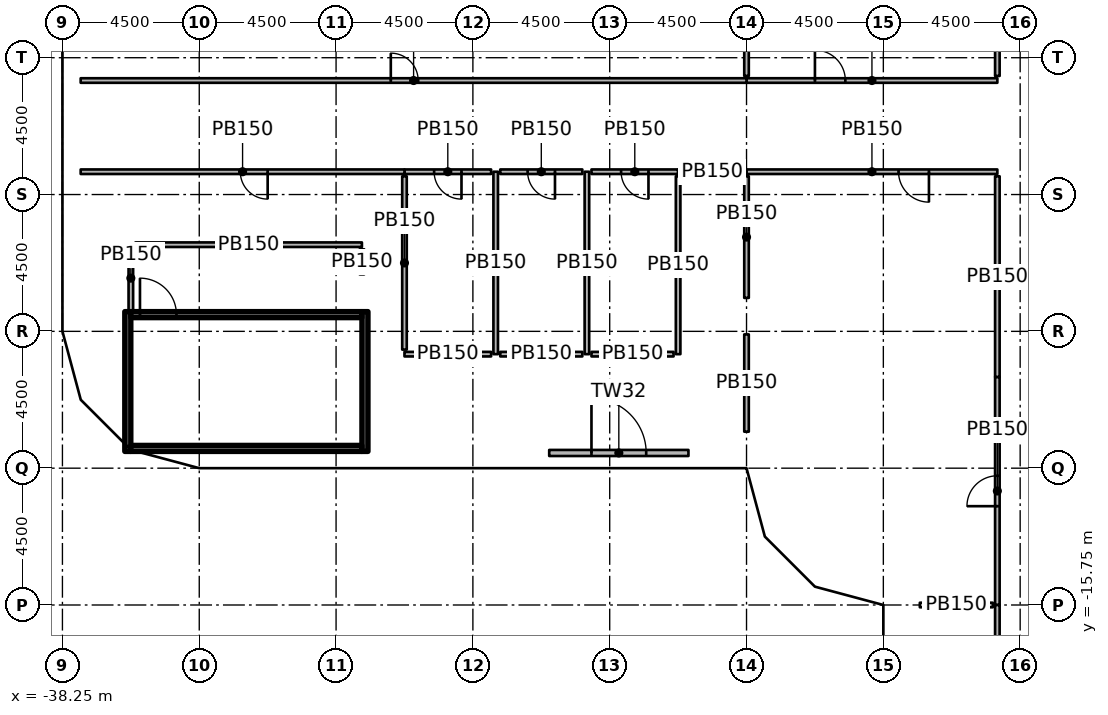
"""IFC4 building model, lengths in metres.
Left out: names, types, materials, properties, quantities, classifications, styles, units other than length and angle.
Written with IfcOpenShell. Run it as: python <this file> out.ifc"""

import sys

from ifc_helpers import new_model, si_unit, direction, frame, frame_2d, origin, origin_2d, place, context, subcontext, project, spatial, rectangle, extrude, element, fill, save


model = new_model("IFC4")
c1 = context("Model", 3, precision=1e-05, world=origin(), true_north=direction((0.0, 1.0)))
c2 = subcontext(c1, "Body", "Model", "MODEL_VIEW")
j1 = project(units=[si_unit("LENGTHUNIT", "METRE"), si_unit("PLANEANGLEUNIT", "RADIAN")], contexts=[c1])
p1 = place(None, origin())
s1 = spatial("IfcSite", under=j1, at=p1, CompositionType="ELEMENT")
p2 = place(p1, origin())
s2 = spatial("IfcBuilding", under=s1, at=p2, CompositionType="ELEMENT")
p3 = place(p2, frame((0.0, 0.0, 22.0)))
s3 = spatial("IfcBuildingStorey", under=s2, at=p3, CompositionType="ELEMENT", Elevation=22.0)
p4 = place(p3, frame((-37.65, 2.25, 0.0), z_axis=(0.0, 0.0, 1.0), x_axis=(1.0, 0.0, 0.0)))
e1 = element("IfcColumn", 1, at=p4, inside=s3, PredefinedType="COLUMN", context=c2, shape_type="SweptSolid", body=[
    extrude(rectangle(XDim=1.2, YDim=1.2, at=origin_2d()), origin(), (0.0, 0.0, 1.0), 4.55),
])
for number, where, z_axis, x_axis in (
    (2, (-33.11, -2.25, 0.0), (0.0, 0.0, 1.0), (1.0, 0.0, 0.0)),
    (3, (-33.11, 2.25, 0.0), (0.0, 0.0, 1.0), (1.0, 0.0, 0.0)),
    (4, (-28.908, -5.475, 0.0), (0.0, 0.0, 1.0), (1.0, 0.0, 0.0)),
):
    element("IfcColumn", number, at=place(p3, frame(where, z_axis=z_axis, x_axis=x_axis)), inside=s3, PredefinedType="COLUMN", context=c2, shape_type="SweptSolid", body=[
        extrude(rectangle(XDim=1.2, YDim=1.2, at=origin_2d()), origin(), (0.0, 0.0, 1.0), 4.85),
    ])
p5 = place(p3, frame((-24.75, -10.65, 0.0), z_axis=(0.0, 0.0, 1.0), x_axis=(1.0, 0.0, 0.0)))
e5 = element("IfcColumn", 5, at=p5, inside=s3, PredefinedType="COLUMN", context=c2, shape_type="SweptSolid", body=[
    extrude(rectangle(XDim=1.2, YDim=1.2, at=origin_2d()), origin(), (0.0, 0.0, 1.0), 4.55),
])
for number, where, z_axis, x_axis in (
    (6, (-24.75, -6.25, 0.0), (0.0, 0.0, 1.0), (1.0, 0.0, 0.0)),
    (7, (-20.25, -6.11, 0.0), (0.0, 0.0, 1.0), (1.0, 0.0, 0.0)),
):
    element("IfcColumn", number, at=place(p3, frame(where, z_axis=z_axis, x_axis=x_axis)), inside=s3, PredefinedType="COLUMN", context=c2, shape_type="SweptSolid", body=[
        extrude(rectangle(XDim=1.2, YDim=1.2, at=origin_2d()), origin(), (0.0, 0.0, 1.0), 4.85),
    ])
p6 = place(p3, frame((-15.15, -10.65, 0.0), z_axis=(0.0, 0.0, 1.0), x_axis=(1.0, 0.0, 0.0)))
e8 = element("IfcColumn", 8, at=p6, inside=s3, PredefinedType="COLUMN", context=c2, shape_type="SweptSolid", body=[
    extrude(rectangle(XDim=1.2, YDim=1.2, at=origin_2d()), origin(), (0.0, 0.0, 1.0), 4.55),
])
p7 = place(p3, frame((-15.75, -6.25, 0.0), z_axis=(0.0, 0.0, 1.0), x_axis=(1.0, 0.0, 0.0)))
e9 = element("IfcColumn", 9, at=p7, inside=s3, PredefinedType="COLUMN", context=c2, shape_type="SweptSolid", body=[
    extrude(rectangle(XDim=1.2, YDim=1.2, at=origin_2d()), origin(), (0.0, 0.0, 1.0), 4.85),
])
p8 = place(p3, frame((-10.65, -15.15, 0.0), z_axis=(0.0, 0.0, 1.0), x_axis=(1.0, 0.0, 0.0)))
e10 = element("IfcColumn", 10, at=p8, inside=s3, PredefinedType="COLUMN", context=c2, shape_type="SweptSolid", body=[
    extrude(rectangle(XDim=1.2, YDim=1.2, at=origin_2d()), origin(), (0.0, 0.0, 1.0), 4.55),
])
for number, where, z_axis, x_axis in (
    (11, (-10.75, -6.25, 0.0), (0.0, 0.0, 1.0), (1.0, 0.0, 0.0)),
    (12, (-6.25, -15.75, 0.0), (0.0, 0.0, 1.0), (1.0, 0.0, 0.0)),
    (13, (-6.25, -10.75, 0.0), (0.0, 0.0, 1.0), (1.0, 0.0, 0.0)),
    (14, (-6.25, -6.25, 0.0), (0.0, 0.0, 1.0), (1.0, 0.0, 0.0)),
):
    element("IfcColumn", number, at=place(p3, frame(where, z_axis=z_axis, x_axis=x_axis)), inside=s3, PredefinedType="COLUMN", context=c2, shape_type="SweptSolid", body=[
        extrude(rectangle(XDim=1.2, YDim=1.2, at=origin_2d()), origin(), (0.0, 0.0, 1.0), 4.85),
    ])
p9 = place(p3, frame((-22.24, -10.75, 0.0), z_axis=(0.0, 0.0, 1.0), x_axis=(1.0, 0.0, 0.0)))
e15 = element("IfcWall", 15, at=p9, inside=s3, PredefinedType="SOLIDWALL", context=c2, shape_type="SweptSolid", body=[
    extrude(rectangle(XDim=4.58, YDim=0.2, at=frame_2d((2.29, 0.0))), origin(), (0.0, 0.0, 1.0), 3.95),
])
p10 = place(p9, frame((1.39, 0.0, 0.0)))
e16 = element("IfcOpeningElement", 16, at=p10, cuts=e15, PredefinedType="OPENING", context=c2, shape_type="SweptSolid", body=[
    extrude(rectangle(XDim=1.8, YDim=2.4, at=frame_2d((0.9, 1.2))), frame((0.0, 0.11, 0.0), z_axis=(0.0, -1.0, 0.0), x_axis=(1.0, 0.0, 0.0)), (0.0, 0.0, 1.0), 0.22),
])
for number, where, z_axis, x_axis in (
    (17, (-36.1, -10.7, 0.0), (0.0, 0.0, 1.0), (0.0, 1.0, 0.0)),
    (18, (-28.3, -10.7, 0.0), (0.0, 0.0, 1.0), (0.0, 1.0, 0.0)),
):
    element("IfcWall", number, at=place(p3, frame(where, z_axis=z_axis, x_axis=x_axis)), inside=s3, PredefinedType="SHEAR", context=c2, shape_type="SweptSolid", body=[
        extrude(rectangle(XDim=4.6, YDim=0.2, at=frame_2d((2.3, 0.0))), origin(), (0.0, 0.0, 1.0), 4.55),
    ])
p11 = place(p3, frame((-36.0, -10.6, 0.0), z_axis=(0.0, 0.0, 1.0), x_axis=(1.0, 0.0, 0.0)))
e19 = element("IfcWall", 19, at=p11, inside=s3, PredefinedType="SHEAR", context=c2, shape_type="SweptSolid", body=[
    extrude(rectangle(XDim=7.6, YDim=0.2, at=frame_2d((3.8, 0.0))), origin(), (0.0, 0.0, 1.0), 4.55),
])
p12 = place(p3, frame((-36.0, -6.2, 0.0), z_axis=(0.0, 0.0, 1.0), x_axis=(1.0, 0.0, 0.0)))
e20 = element("IfcWall", 20, at=p12, inside=s3, PredefinedType="SHEAR", context=c2, shape_type="SweptSolid", body=[
    extrude(rectangle(XDim=7.6, YDim=0.2, at=frame_2d((3.8, 0.0))), origin(), (0.0, 0.0, 1.0), 4.55),
])
p13 = place(p12, frame((0.3, 0.0, 0.0)))
e21 = element("IfcOpeningElement", 21, at=p13, cuts=e20, PredefinedType="OPENING", context=c2, shape_type="SweptSolid", body=[
    extrude(rectangle(XDim=1.2, YDim=2.1, at=frame_2d((0.6, 1.05))), frame((0.0, 0.11, 0.0), z_axis=(0.0, -1.0, 0.0), x_axis=(1.0, 0.0, 0.0)), (0.0, 0.0, 1.0), 0.22),
])
p14 = place(p3, frame((-36.0, -6.1, 0.0), z_axis=(0.0, 0.0, 1.0), x_axis=(0.0, 1.0, 0.0)))
e22 = element("IfcWall", 22, at=p14, inside=s3, PredefinedType="PARTITIONING", context=c2, shape_type="SweptSolid", body=[
    extrude(rectangle(XDim=2.2, YDim=0.15, at=frame_2d((1.1, 0.0))), origin(), (0.0, 0.0, 1.0), 4.55),
])
p15 = place(p3, frame((-35.85, -3.9, 0.0), z_axis=(0.0, 0.0, 1.0), x_axis=(1.0, 0.0, 0.0)))
e23 = element("IfcWall", 23, at=p15, inside=s3, PredefinedType="PARTITIONING", context=c2, shape_type="SweptSolid", body=[
    extrude(rectangle(XDim=7.45, YDim=0.15, at=frame_2d((3.725, 0.0))), origin(), (0.0, 0.0, 1.0), 3.93),
])
p16 = place(p3, frame((-28.4, -4.05, 0.0), z_axis=(0.0, 0.0, 1.0), x_axis=(0.0, -1.0, 0.0)))
e24 = element("IfcWall", 24, at=p16, inside=s3, PredefinedType="PARTITIONING", context=c2, shape_type="SweptSolid", body=[
    extrude(rectangle(XDim=0.825, YDim=0.15, at=frame_2d((0.413, 0.0))), origin(), (0.0, 0.0, 1.0), 4.55),
])
p17 = place(p3, frame((-24.0, -1.5, 0.0), z_axis=(0.0, 0.0, 1.0), x_axis=(0.0, -1.0, 0.0)))
e25 = element("IfcWall", 25, at=p17, inside=s3, PredefinedType="PARTITIONING", context=c2, shape_type="SweptSolid", body=[
    extrude(rectangle(XDim=6.0, YDim=0.15, at=frame_2d((3.0, 0.0))), origin(), (0.0, 0.0, 1.0), 3.93),
])
p18 = place(p3, frame((-24.15, -1.5, 0.0), z_axis=(0.0, 0.0, 1.0), x_axis=(-1.0, 0.0, 0.0)))
e26 = element("IfcWall", 26, at=p18, inside=s3, PredefinedType="PARTITIONING", context=c2, shape_type="SweptSolid", body=[
    extrude(rectangle(XDim=2.85, YDim=0.15, at=frame_2d((1.425, 0.0))), origin(), (0.0, 0.0, 1.0), 4.063),
])
p19 = place(p18, frame((0.975, 0.0, 0.0)))
e27 = element("IfcOpeningElement", 27, at=p19, cuts=e26, PredefinedType="OPENING", context=c2, shape_type="SweptSolid", body=[
    extrude(rectangle(XDim=0.9, YDim=2.1, at=frame_2d((0.45, 1.05))), frame((0.0, 0.085, 0.0), z_axis=(0.0, -1.0, 0.0), x_axis=(1.0, 0.0, 0.0)), (0.0, 0.0, 1.0), 0.17),
])
p20 = place(p3, frame((-24.15, -7.5, 0.0), z_axis=(0.0, 0.0, 1.0), x_axis=(-1.0, 0.0, 0.0)))
e28 = element("IfcWall", 28, at=p20, inside=s3, PredefinedType="PARTITIONING", context=c2, shape_type="SweptSolid", body=[
    extrude(rectangle(XDim=2.85, YDim=0.15, at=frame_2d((1.425, 0.0))), origin(), (0.0, 0.0, 1.0), 4.55),
])
p21 = place(p3, frame((-27.0, -7.35, 0.0), z_axis=(0.0, 0.0, 1.0), x_axis=(0.0, 1.0, 0.0)))
e29 = element("IfcWall", 29, at=p21, inside=s3, PredefinedType="PARTITIONING", context=c2, shape_type="SweptSolid", body=[
    extrude(rectangle(XDim=5.7, YDim=0.15, at=frame_2d((2.85, 0.0))), origin(), (0.0, 0.0, 1.0), 3.93),
])
p22 = place(p3, frame((-21.0, -1.5, 0.0), z_axis=(0.0, 0.0, 1.0), x_axis=(0.0, -1.0, 0.0)))
e30 = element("IfcWall", 30, at=p22, inside=s3, PredefinedType="PARTITIONING", context=c2, shape_type="SweptSolid", body=[
    extrude(rectangle(XDim=6.0, YDim=0.15, at=frame_2d((3.0, 0.0))), origin(), (0.0, 0.0, 1.0), 3.93),
])
p23 = place(p3, frame((-21.15, -1.5, 0.0), z_axis=(0.0, 0.0, 1.0), x_axis=(-1.0, 0.0, 0.0)))
e31 = element("IfcWall", 31, at=p23, inside=s3, PredefinedType="PARTITIONING", context=c2, shape_type="SweptSolid", body=[
    extrude(rectangle(XDim=2.7, YDim=0.15, at=frame_2d((1.35, 0.0))), origin(), (0.0, 0.0, 1.0), 4.55),
])
p24 = place(p23, frame((0.9, 0.0, 0.0)))
e32 = element("IfcOpeningElement", 32, at=p24, cuts=e31, PredefinedType="OPENING", context=c2, shape_type="SweptSolid", body=[
    extrude(rectangle(XDim=0.9, YDim=2.1, at=frame_2d((0.45, 1.05))), frame((0.0, 0.085, 0.0), z_axis=(0.0, -1.0, 0.0), x_axis=(1.0, 0.0, 0.0)), (0.0, 0.0, 1.0), 0.17),
])
p25 = place(p3, frame((-21.15, -7.5, 0.0), z_axis=(0.0, 0.0, 1.0), x_axis=(-1.0, 0.0, 0.0)))
e33 = element("IfcWall", 33, at=p25, inside=s3, PredefinedType="PARTITIONING", context=c2, shape_type="SweptSolid", body=[
    extrude(rectangle(XDim=2.7, YDim=0.15, at=frame_2d((1.35, 0.0))), origin(), (0.0, 0.0, 1.0), 4.55),
])
p26 = place(p3, frame((-18.0, -1.5, 0.0), z_axis=(0.0, 0.0, 1.0), x_axis=(-1.0, 0.0, 0.0)))
e34 = element("IfcWall", 34, at=p26, inside=s3, PredefinedType="PARTITIONING", context=c2, shape_type="SweptSolid", body=[
    extrude(rectangle(XDim=2.85, YDim=0.15, at=frame_2d((1.425, 0.0))), origin(), (0.0, 0.0, 1.0), 4.063),
])
p27 = place(p26, frame((0.975, 0.0, 0.0)))
e35 = element("IfcOpeningElement", 35, at=p27, cuts=e34, PredefinedType="OPENING", context=c2, shape_type="SweptSolid", body=[
    extrude(rectangle(XDim=0.9, YDim=2.1, at=frame_2d((0.45, 1.05))), frame((0.0, 0.085, 0.0), z_axis=(0.0, -1.0, 0.0), x_axis=(1.0, 0.0, 0.0)), (0.0, 0.0, 1.0), 0.17),
])
p28 = place(p3, frame((-18.0, -1.65, 0.0), z_axis=(0.0, 0.0, 1.0), x_axis=(0.0, -1.0, 0.0)))
e36 = element("IfcWall", 36, at=p28, inside=s3, PredefinedType="PARTITIONING", context=c2, shape_type="SweptSolid", body=[
    extrude(rectangle(XDim=5.85, YDim=0.15, at=frame_2d((2.925, 0.0))), origin(), (0.0, 0.0, 1.0), 3.93),
])
p29 = place(p3, frame((-18.15, -7.5, 0.0), z_axis=(0.0, 0.0, 1.0), x_axis=(-1.0, 0.0, 0.0)))
e37 = element("IfcWall", 37, at=p29, inside=s3, PredefinedType="PARTITIONING", context=c2, shape_type="SweptSolid", body=[
    extrude(rectangle(XDim=2.7, YDim=0.15, at=frame_2d((1.35, 0.0))), origin(), (0.0, 0.0, 1.0), 4.55),
])
p30 = place(p3, frame((-7.5, -15.75, 0.0), z_axis=(0.0, 0.0, 1.0), x_axis=(0.0, 1.0, 0.0)))
e38 = element("IfcWall", 38, at=p30, inside=s3, PredefinedType="PARTITIONING", context=c2, shape_type="SweptSolid", body=[
    extrude(rectangle(XDim=7.5, YDim=0.15, at=frame_2d((3.75, 0.0))), origin(), (0.0, 0.0, 1.0), 3.93),
])
p31 = place(p30, frame((3.25, 0.0, 0.0)))
e39 = element("IfcOpeningElement", 39, at=p31, cuts=e38, PredefinedType="OPENING", context=c2, shape_type="SweptSolid", body=[
    extrude(rectangle(XDim=1.0, YDim=2.1, at=frame_2d((0.5, 1.05))), frame((0.0, 0.085, 0.0), z_axis=(0.0, -1.0, 0.0), x_axis=(1.0, 0.0, 0.0)), (0.0, 0.0, 1.0), 0.17),
])
p32 = place(p3, frame((-7.5, -32.25, 0.0), z_axis=(0.0, 0.0, 1.0), x_axis=(0.0, 1.0, 0.0)))
e40 = element("IfcWall", 40, at=p32, inside=s3, PredefinedType="PARTITIONING", context=c2, shape_type="SweptSolid", body=[
    extrude(rectangle(XDim=16.5, YDim=0.15, at=frame_2d((8.25, 0.0))), origin(), (0.0, 0.0, 1.0), 4.55),
])
p33 = place(p32, frame((8.25, 0.0, 0.0)))
e41 = element("IfcOpeningElement", 41, at=p33, cuts=e40, PredefinedType="OPENING", context=c2, shape_type="SweptSolid", body=[
    extrude(rectangle(XDim=0.9, YDim=2.1, at=frame_2d((0.45, 1.05))), frame((0.0, 0.085, 0.0), z_axis=(0.0, -1.0, 0.0), x_axis=(1.0, 0.0, 0.0)), (0.0, 0.0, 1.0), 0.17),
])
p34 = place(p3, frame((-15.75, 1.5, 0.0), z_axis=(0.0, 0.0, 1.0), x_axis=(1.0, 0.0, 0.0)))
e42 = element("IfcWall", 42, at=p34, inside=s3, PredefinedType="PARTITIONING", context=c2, shape_type="SweptSolid", body=[
    extrude(rectangle(XDim=8.25, YDim=0.15, at=frame_2d((4.125, 0.0))), origin(), (0.0, 0.0, 1.0), 4.063),
])
p35 = place(p34, frame((2.25, 0.0, 0.0)))
e43 = element("IfcOpeningElement", 43, at=p35, cuts=e42, PredefinedType="OPENING", context=c2, shape_type="SweptSolid", body=[
    extrude(rectangle(XDim=1.0, YDim=2.1, at=frame_2d((0.5, 1.05))), frame((0.0, 0.085, 0.0), z_axis=(0.0, -1.0, 0.0), x_axis=(1.0, 0.0, 0.0)), (0.0, 0.0, 1.0), 0.17),
])
p36 = place(p3, frame((-37.65, 1.5, 0.0), z_axis=(0.0, 0.0, 1.0), x_axis=(1.0, 0.0, 0.0)))
e44 = element("IfcWall", 44, at=p36, inside=s3, PredefinedType="PARTITIONING", context=c2, shape_type="SweptSolid", body=[
    extrude(rectangle(XDim=21.9, YDim=0.15, at=frame_2d((10.95, 0.0))), origin(), (0.0, 0.0, 1.0), 3.93),
])
p37 = place(p36, frame((10.2, 0.0, 0.0)))
e45 = element("IfcOpeningElement", 45, at=p37, cuts=e44, PredefinedType="OPENING", context=c2, shape_type="SweptSolid", body=[
    extrude(rectangle(XDim=0.9, YDim=2.1, at=frame_2d((0.45, 1.05))), frame((0.0, 0.085, 0.0), z_axis=(0.0, -1.0, 0.0), x_axis=(1.0, 0.0, 0.0)), (0.0, 0.0, 1.0), 0.17),
])
p38 = place(p3, frame((-7.5, -1.5, 0.0), z_axis=(0.0, 0.0, 1.0), x_axis=(-1.0, 0.0, 0.0)))
e46 = element("IfcWall", 46, at=p38, inside=s3, PredefinedType="PARTITIONING", context=c2, shape_type="SweptSolid", body=[
    extrude(rectangle(XDim=8.25, YDim=0.15, at=frame_2d((4.125, 0.0))), origin(), (0.0, 0.0, 1.0), 4.063),
])
p39 = place(p38, frame((2.25, 0.0, 0.0)))
e47 = element("IfcOpeningElement", 47, at=p39, cuts=e46, PredefinedType="OPENING", context=c2, shape_type="SweptSolid", body=[
    extrude(rectangle(XDim=1.0, YDim=2.1, at=frame_2d((0.5, 1.05))), frame((0.0, 0.085, 0.0), z_axis=(0.0, -1.0, 0.0), x_axis=(1.0, 0.0, 0.0)), (0.0, 0.0, 1.0), 0.17),
])
p40 = place(p3, frame((-27.0, -1.5, 0.0), z_axis=(0.0, 0.0, 1.0), x_axis=(-1.0, 0.0, 0.0)))
e48 = element("IfcWall", 48, at=p40, inside=s3, PredefinedType="PARTITIONING", context=c2, shape_type="SweptSolid", body=[
    extrude(rectangle(XDim=10.65, YDim=0.15, at=frame_2d((5.325, 0.0))), origin(), (0.0, 0.0, 1.0), 3.93),
])
p41 = place(p40, frame((4.5, 0.0, 0.0)))
e49 = element("IfcOpeningElement", 49, at=p41, cuts=e48, PredefinedType="OPENING", context=c2, shape_type="SweptSolid", body=[
    extrude(rectangle(XDim=0.9, YDim=2.1, at=frame_2d((0.45, 1.05))), frame((0.0, 0.085, 0.0), z_axis=(0.0, -1.0, 0.0), x_axis=(1.0, 0.0, 0.0)), (0.0, 0.0, 1.0), 0.17),
])
p42 = place(p3, frame((-15.75, -1.5, 0.0), z_axis=(0.0, 0.0, 1.0), x_axis=(-1.0, 0.0, 0.0)))
e50 = element("IfcWall", 50, at=p42, inside=s3, PredefinedType="PARTITIONING", context=c2, shape_type="SweptSolid", body=[
    extrude(rectangle(XDim=2.25, YDim=0.15, at=frame_2d((1.125, 0.0))), origin(), (0.0, 0.0, 1.0), 4.063),
])
p43 = place(p3, frame((-15.75, 1.65, 0.0), z_axis=(0.0, 0.0, 1.0), x_axis=(0.0, 1.0, 0.0)))
e51 = element("IfcWall", 51, at=p43, inside=s3, PredefinedType="PARTITIONING", context=c2, shape_type="SweptSolid", body=[
    extrude(rectangle(XDim=4.0, YDim=0.15, at=frame_2d((2.0, 0.0))), origin(), (0.0, 0.0, 1.0), 4.063),
])
p44 = place(p3, frame((-7.5, 8.25, 0.0), z_axis=(0.0, 0.0, 1.0), x_axis=(0.0, -1.0, 0.0)))
e52 = element("IfcWall", 52, at=p44, inside=s3, PredefinedType="PARTITIONING", context=c2, shape_type="SweptSolid", body=[
    extrude(rectangle(XDim=6.6, YDim=0.15, at=frame_2d((3.3, 0.0))), origin(), (0.0, 0.0, 1.0), 3.911),
])
p45 = place(p3, frame((-15.75, -10.05, 0.0), z_axis=(0.0, 0.0, 1.0), x_axis=(0.0, 1.0, 0.0)))
e53 = element("IfcWall", 53, at=p45, inside=s3, PredefinedType="PARTITIONING", context=c2, shape_type="SweptSolid", body=[
    extrude(rectangle(XDim=3.2, YDim=0.15, at=frame_2d((1.6, 0.0))), origin(), (0.0, 0.0, 1.0), 4.55),
])
p46 = place(p3, frame((-15.75, -5.65, 0.0), z_axis=(0.0, 0.0, 1.0), x_axis=(0.0, 1.0, 0.0)))
e54 = element("IfcWall", 54, at=p46, inside=s3, PredefinedType="PARTITIONING", context=c2, shape_type="SweptSolid", body=[
    extrude(rectangle(XDim=4.0, YDim=0.15, at=frame_2d((2.0, 0.0))), origin(), (0.0, 0.0, 1.0), 4.063),
])
p47 = place(p3, frame((-7.65, -15.75, 0.0), z_axis=(0.0, 0.0, 1.0), x_axis=(-1.0, 0.0, 0.0)))
e55 = element("IfcWall", 55, at=p47, inside=s3, PredefinedType="PARTITIONING", context=c2, shape_type="SweptSolid", body=[
    extrude(rectangle(XDim=2.4, YDim=0.15, at=frame_2d((1.2, 0.0))), origin(), (0.0, 0.0, 1.0), 4.55),
])
p48 = place(p3, frame((-7.5, -1.65, 0.0), z_axis=(0.0, 0.0, 1.0), x_axis=(0.0, -1.0, 0.0)))
e56 = element("IfcWall", 56, at=p48, inside=s3, PredefinedType="PARTITIONING", context=c2, shape_type="SweptSolid", body=[
    extrude(rectangle(XDim=6.6, YDim=0.15, at=frame_2d((3.3, 0.0))), origin(), (0.0, 0.0, 1.0), 3.911),
])
p49 = place(p10, origin())
e57 = element("IfcDoor", 57, at=p49, inside=s3, OperationType="SINGLE_SWING_LEFT", PredefinedType="DOOR", context=c2, shape_type="SweptSolid", body=[
    extrude(rectangle(XDim=1.8, YDim=2.4, at=frame_2d((0.9, 1.2))), frame((0.0, 0.025, 0.0), z_axis=(0.0, -1.0, 0.0), x_axis=(1.0, 0.0, 0.0)), (0.0, 0.0, 1.0), 0.05),
])
fill(e16, e57)
p50 = place(p13, origin())
e58 = element("IfcDoor", 58, at=p50, inside=s3, OperationType="SINGLE_SWING_RIGHT", PredefinedType="DOOR", context=c2, shape_type="SweptSolid", body=[
    extrude(rectangle(XDim=1.2, YDim=2.1, at=frame_2d((0.6, 1.05))), frame((0.0, 0.025, 0.0), z_axis=(0.0, -1.0, 0.0), x_axis=(1.0, 0.0, 0.0)), (0.0, 0.0, 1.0), 0.05),
])
fill(e21, e58)
p51 = place(p19, origin())
e59 = element("IfcDoor", 59, at=p51, inside=s3, OperationType="SINGLE_SWING_LEFT", PredefinedType="DOOR", context=c2, shape_type="SweptSolid", body=[
    extrude(rectangle(XDim=0.9, YDim=2.1, at=frame_2d((0.45, 1.05))), frame((0.0, 0.025, 0.0), z_axis=(0.0, -1.0, 0.0), x_axis=(1.0, 0.0, 0.0)), (0.0, 0.0, 1.0), 0.05),
])
fill(e27, e59)
p52 = place(p24, origin())
e60 = element("IfcDoor", 60, at=p52, inside=s3, OperationType="SINGLE_SWING_LEFT", PredefinedType="DOOR", context=c2, shape_type="SweptSolid", body=[
    extrude(rectangle(XDim=0.9, YDim=2.1, at=frame_2d((0.45, 1.05))), frame((0.0, 0.025, 0.0), z_axis=(0.0, -1.0, 0.0), x_axis=(1.0, 0.0, 0.0)), (0.0, 0.0, 1.0), 0.05),
])
fill(e32, e60)
p53 = place(p27, origin())
e61 = element("IfcDoor", 61, at=p53, inside=s3, OperationType="SINGLE_SWING_LEFT", PredefinedType="DOOR", context=c2, shape_type="SweptSolid", body=[
    extrude(rectangle(XDim=0.9, YDim=2.1, at=frame_2d((0.45, 1.05))), frame((0.0, 0.025, 0.0), z_axis=(0.0, -1.0, 0.0), x_axis=(1.0, 0.0, 0.0)), (0.0, 0.0, 1.0), 0.05),
])
fill(e35, e61)
p54 = place(p31, origin())
e62 = element("IfcDoor", 62, at=p54, inside=s3, OperationType="SINGLE_SWING_LEFT", PredefinedType="DOOR", context=c2, shape_type="SweptSolid", body=[
    extrude(rectangle(XDim=1.0, YDim=2.1, at=frame_2d((0.5, 1.05))), frame((0.0, 0.025, 0.0), z_axis=(0.0, -1.0, 0.0), x_axis=(1.0, 0.0, 0.0)), (0.0, 0.0, 1.0), 0.05),
])
fill(e39, e62)
p55 = place(p35, origin())
e63 = element("IfcDoor", 63, at=p55, inside=s3, OperationType="SINGLE_SWING_LEFT", PredefinedType="DOOR", context=c2, shape_type="SweptSolid", body=[
    extrude(rectangle(XDim=1.0, YDim=2.1, at=frame_2d((0.5, 1.05))), frame((0.0, 0.025, 0.0), z_axis=(0.0, -1.0, 0.0), x_axis=(1.0, 0.0, 0.0)), (0.0, 0.0, 1.0), 0.05),
])
fill(e43, e63)
p56 = place(p37, origin())
e64 = element("IfcDoor", 64, at=p56, inside=s3, OperationType="SINGLE_SWING_LEFT", PredefinedType="DOOR", context=c2, shape_type="SweptSolid", body=[
    extrude(rectangle(XDim=0.9, YDim=2.1, at=frame_2d((0.45, 1.05))), frame((0.0, 0.025, 0.0), z_axis=(0.0, -1.0, 0.0), x_axis=(1.0, 0.0, 0.0)), (0.0, 0.0, 1.0), 0.05),
])
fill(e45, e64)
p57 = place(p39, origin())
e65 = element("IfcDoor", 65, at=p57, inside=s3, OperationType="SINGLE_SWING_LEFT", PredefinedType="DOOR", context=c2, shape_type="SweptSolid", body=[
    extrude(rectangle(XDim=1.0, YDim=2.1, at=frame_2d((0.5, 1.05))), frame((0.0, 0.025, 0.0), z_axis=(0.0, -1.0, 0.0), x_axis=(1.0, 0.0, 0.0)), (0.0, 0.0, 1.0), 0.05),
])
fill(e47, e65)
p58 = place(p41, origin())
e66 = element("IfcDoor", 66, at=p58, inside=s3, OperationType="SINGLE_SWING_LEFT", PredefinedType="DOOR", context=c2, shape_type="SweptSolid", body=[
    extrude(rectangle(XDim=0.9, YDim=2.1, at=frame_2d((0.45, 1.05))), frame((0.0, 0.025, 0.0), z_axis=(0.0, -1.0, 0.0), x_axis=(1.0, 0.0, 0.0)), (0.0, 0.0, 1.0), 0.05),
])
fill(e49, e66)
save(model, sys.argv[1])
